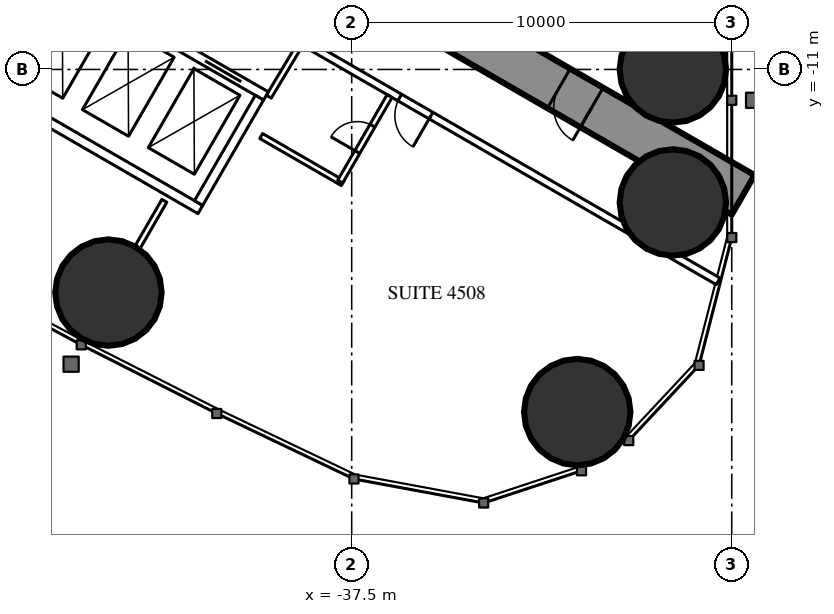
"""IFC4 building model, lengths in metres.
Left out: names, types, materials, properties, quantities, classifications, styles, units other than length and angle.
Written with IfcOpenShell. Run it as: python <this file> out.ifc"""

import sys

from ifc_helpers import new_model, si_unit, direction, frame, frame_2d, origin, origin_2d, place, context, subcontext, project, spatial, rectangle, circle, extrude, element, fill, save


model = new_model("IFC4")
c1 = context("Model", 3, precision=1e-05, world=origin(), true_north=direction((0.0, 1.0)))
c2 = subcontext(c1, "Body", "Model", "MODEL_VIEW")
j1 = project(units=[si_unit("LENGTHUNIT", "METRE"), si_unit("PLANEANGLEUNIT", "RADIAN")], contexts=[c1])
p1 = place(None, origin())
s1 = spatial("IfcSite", under=j1, at=p1, CompositionType="ELEMENT")
p2 = place(p1, origin())
s2 = spatial("IfcBuilding", under=s1, at=p2, CompositionType="ELEMENT")
p3 = place(p2, frame((0.0, 0.0, 170.3)))
s3 = spatial("IfcBuildingStorey", under=s2, at=p3, CompositionType="ELEMENT", Elevation=170.3)
for number, where, z_axis, x_axis in (
    (1, (-31.565, -20.016, 0.0), (0.0, 0.0, 1.0), (1.0, 0.0, 0.0)),
    (2, (-29.05, -11.0, 0.0), (0.0, 0.0, 1.0), (1.0, 0.0, 0.0)),
    (3, (-29.05, -14.5, 0.0), (0.0, 0.0, 1.0), (1.0, 0.0, 0.0)),
    (4, (-43.9, -16.871, 0.0), (0.0, 0.0, 1.0), (1.0, 0.0, 0.0)),
):
    element("IfcColumn", number, at=place(p3, frame(where, z_axis=z_axis, x_axis=x_axis)), inside=s3, PredefinedType="COLUMN", context=c2, shape_type="SweptSolid", body=[
        extrude(circle(Radius=1.4, at=origin_2d()), origin(), (0.0, 0.0, 1.0), 3.5),
    ])
p4 = place(p3, frame((-27.2, -14.3, 0.0), z_axis=(0.0, 0.0, 1.0), x_axis=(-0.866024021859, 0.500002393557, 0.0)))
e5 = element("IfcWall", 5, at=p4, inside=s3, PredefinedType="SHEAR", context=c2, shape_type="SweptSolid", body=[
    extrude(rectangle(XDim=27.907, YDim=1.2, at=frame_2d((13.954, 0.0))), origin(), (0.0, 0.0, 1.0), 3.5),
])
p5 = place(p4, frame((4.6, 0.0, 0.0)))
e6 = element("IfcOpeningElement", 6, at=p5, cuts=e5, PredefinedType="OPENING", context=c2, shape_type="SweptSolid", body=[
    extrude(rectangle(XDim=1.0, YDim=2.2, at=frame_2d((0.5, 1.1))), frame((0.0, 0.61, 0.0), z_axis=(0.0, -1.0, 0.0), x_axis=(1.0, 0.0, 0.0)), (0.0, 0.0, 1.0), 1.22),
])
p6 = place(p4, frame((13.395, 0.0, 0.0)))
e7 = element("IfcOpeningElement", 7, at=p6, cuts=e5, PredefinedType="OPENING", context=c2, shape_type="SweptSolid", body=[
    extrude(rectangle(XDim=1.8, YDim=2.2, at=frame_2d((0.9, 1.1))), frame((0.0, 0.61, 0.0), z_axis=(0.0, -1.0, 0.0), x_axis=(1.0, 0.0, 0.0)), (0.0, 0.0, 1.0), 1.22),
])
p7 = place(p3, frame((-42.429, -14.457, 0.0), z_axis=(0.0, 0.0, 1.0), x_axis=(-0.5000578829, -0.865991982497, 0.0)))
e8 = element("IfcWall", 8, at=p7, inside=s3, PredefinedType="PARTITIONING", context=c2, shape_type="SweptSolid", body=[
    extrude(rectangle(XDim=1.407, YDim=0.15, at=frame_2d((0.704, 0.0))), origin(), (0.0, 0.0, 1.0), 3.25),
])
p8 = place(p3, frame((-27.86, -16.575, 0.0), z_axis=(0.0, 0.0, 1.0), x_axis=(-0.866027756871, 0.499995924312, 0.0)))
e9 = element("IfcWall", 9, at=p8, inside=s3, PredefinedType="PARTITIONING", context=c2, shape_type="SweptSolid", body=[
    extrude(rectangle(XDim=12.622, YDim=0.2, at=frame_2d((6.311, 0.0))), origin(), (0.0, 0.0, 1.0), 3.25),
])
p9 = place(p8, frame((8.722, 0.0, 0.0)))
e10 = element("IfcOpeningElement", 10, at=p9, cuts=e9, PredefinedType="OPENING", context=c2, shape_type="SweptSolid", body=[
    extrude(rectangle(XDim=0.95, YDim=2.2, at=frame_2d((0.475, 1.1))), frame((0.0, 0.11, 0.0), z_axis=(0.0, -1.0, 0.0), x_axis=(1.0, 0.0, 0.0)), (0.0, 0.0, 1.0), 0.22),
])
p10 = place(p3, frame((-39.683, -11.718, 0.0), z_axis=(0.0, 0.0, 1.0), x_axis=(0.514336634837, 0.857588377991, 0.0)))
e11 = element("IfcWall", 11, at=p10, inside=s3, PredefinedType="PARTITIONING", context=c2, shape_type="SweptSolid", body=[
    extrude(rectangle(XDim=1.805, YDim=0.15, at=frame_2d((0.903, 0.0))), origin(), (0.0, 0.0, 1.0), 3.25),
])
p11 = place(p3, frame((-37.738, -13.989, 0.0), z_axis=(0.0, 0.0, 1.0), x_axis=(-0.86604923931, 0.499958713387, 0.0)))
e12 = element("IfcWall", 12, at=p11, inside=s3, PredefinedType="PARTITIONING", context=c2, shape_type="SweptSolid", body=[
    extrude(rectangle(XDim=2.475, YDim=0.15, at=frame_2d((1.237, 0.0))), origin(), (0.0, 0.0, 1.0), 3.25),
])
p12 = place(p3, frame((-36.503, -11.7, 0.0), z_axis=(0.0, 0.0, 1.0), x_axis=(-0.500006934395, -0.866021400173, 0.0)))
e13 = element("IfcWall", 13, at=p12, inside=s3, PredefinedType="PARTITIONING", context=c2, shape_type="SweptSolid", body=[
    extrude(rectangle(XDim=2.6, YDim=0.15, at=frame_2d((1.3, 0.0))), origin(), (0.0, 0.0, 1.0), 3.25),
])
p13 = place(p12, frame((0.9, 0.0, 0.0)))
e14 = element("IfcOpeningElement", 14, at=p13, cuts=e13, PredefinedType="OPENING", context=c2, shape_type="SweptSolid", body=[
    extrude(rectangle(XDim=0.8, YDim=2.2, at=frame_2d((0.4, 1.1))), frame((0.0, 0.085, 0.0), z_axis=(0.0, -1.0, 0.0), x_axis=(1.0, 0.0, 0.0)), (0.0, 0.0, 1.0), 0.17),
])
p14 = place(p3, frame((-39.758, -11.697, 0.0), z_axis=(0.0, 0.0, 1.0), x_axis=(-0.866024194504, 0.500002094529, 0.0)))
e15 = element("IfcWall", 15, at=p14, inside=s3, PredefinedType="PARTITIONING", context=c2, shape_type="SweptSolid", body=[
    extrude(rectangle(XDim=6.6, YDim=0.25, at=frame_2d((3.3, 0.0))), origin(), (0.0, 0.0, 1.0), 3.25),
])
p15 = place(p14, frame((0.75, 0.0, 0.0)))
e16 = element("IfcOpeningElement", 16, at=p15, cuts=e15, PredefinedType="OPENING", context=c2, shape_type="SweptSolid", body=[
    extrude(rectangle(XDim=1.1, YDim=2.2, at=frame_2d((0.55, 1.1))), frame((0.0, 0.135, 0.0), z_axis=(0.0, -1.0, 0.0), x_axis=(1.0, 0.0, 0.0)), (0.0, 0.0, 1.0), 0.27),
])
p16 = place(p14, frame((2.75, 0.0, 0.0)))
e17 = element("IfcOpeningElement", 17, at=p16, cuts=e15, PredefinedType="OPENING", context=c2, shape_type="SweptSolid", body=[
    extrude(rectangle(XDim=1.1, YDim=2.2, at=frame_2d((0.55, 1.1))), frame((0.0, 0.135, 0.0), z_axis=(0.0, -1.0, 0.0), x_axis=(1.0, 0.0, 0.0)), (0.0, 0.0, 1.0), 0.27),
])
p17 = place(p14, frame((4.75, 0.0, 0.0)))
e18 = element("IfcOpeningElement", 18, at=p17, cuts=e15, PredefinedType="OPENING", context=c2, shape_type="SweptSolid", body=[
    extrude(rectangle(XDim=1.1, YDim=2.2, at=frame_2d((0.55, 1.1))), frame((0.0, 0.135, 0.0), z_axis=(0.0, -1.0, 0.0), x_axis=(1.0, 0.0, 0.0)), (0.0, 0.0, 1.0), 0.27),
])
p18 = place(p3, frame((-41.482, -14.686, 0.0), z_axis=(0.0, 0.0, 1.0), x_axis=(-0.86603344179, 0.499986077507, 0.0)))
e19 = element("IfcWall", 19, at=p18, inside=s3, PredefinedType="PARTITIONING", context=c2, shape_type="SweptSolid", body=[
    extrude(rectangle(XDim=6.6, YDim=0.25, at=frame_2d((3.3, 0.0))), origin(), (0.0, 0.0, 1.0), 3.25),
])
for number, where, z_axis, x_axis in (
    (20, (-39.928, -11.743, 0.0), (0.0, 0.0, 1.0), (-0.5, -0.866, 0.0)),
    (21, (-45.428, -8.568, 0.0), (0.0, 0.0, 1.0), (-0.5, -0.866, 0.0)),
):
    element("IfcWall", number, at=place(p3, frame(where, z_axis=z_axis, x_axis=x_axis)), inside=s3, PredefinedType="PARTITIONING", context=c2, shape_type="SweptSolid", body=[
        extrude(rectangle(XDim=3.201, YDim=0.25, at=frame_2d((1.6, 0.0))), origin(), (0.0, 0.0, 1.0), 3.25),
    ])
p19 = place(p13, origin())
e22 = element("IfcDoor", 22, at=p19, inside=s3, OperationType="SINGLE_SWING_RIGHT", PredefinedType="DOOR", context=c2, shape_type="SweptSolid", body=[
    extrude(rectangle(XDim=0.8, YDim=2.2, at=frame_2d((0.4, 1.1))), frame((0.0, 0.025, 0.0), z_axis=(0.0, -1.0, 0.0), x_axis=(1.0, 0.0, 0.0)), (0.0, 0.0, 1.0), 0.05),
])
fill(e14, e22)
p20 = place(p9, origin())
e23 = element("IfcDoor", 23, at=p20, inside=s3, OperationType="SINGLE_SWING_LEFT", PredefinedType="DOOR", context=c2, shape_type="SweptSolid", body=[
    extrude(rectangle(XDim=0.95, YDim=2.2, at=frame_2d((0.475, 1.1))), frame((0.0, 0.025, 0.0), z_axis=(0.0, -1.0, 0.0), x_axis=(1.0, 0.0, 0.0)), (0.0, 0.0, 1.0), 0.05),
])
fill(e10, e23)
p21 = place(p5, origin())
e24 = element("IfcDoor", 24, at=p21, inside=s3, OperationType="SINGLE_SWING_LEFT", PredefinedType="DOOR", context=c2, shape_type="SweptSolid", body=[
    extrude(rectangle(XDim=1.0, YDim=2.2, at=frame_2d((0.5, 1.1))), frame((0.0, 0.025, 0.0), z_axis=(0.0, -1.0, 0.0), x_axis=(1.0, 0.0, 0.0)), (0.0, 0.0, 1.0), 0.05),
])
fill(e6, e24)
p22 = place(p15, origin())
e25 = element("IfcDoor", 25, at=p22, inside=s3, OperationType="DOUBLE_DOOR_SLIDING", PredefinedType="USERDEFINED", context=c2, shape_type="SweptSolid", body=[
    extrude(rectangle(XDim=1.1, YDim=2.2, at=frame_2d((0.55, 1.1))), frame((0.0, 0.025, 0.0), z_axis=(0.0, -1.0, 0.0), x_axis=(1.0, 0.0, 0.0)), (0.0, 0.0, 1.0), 0.05),
])
fill(e16, e25)
save(model, sys.argv[1])
